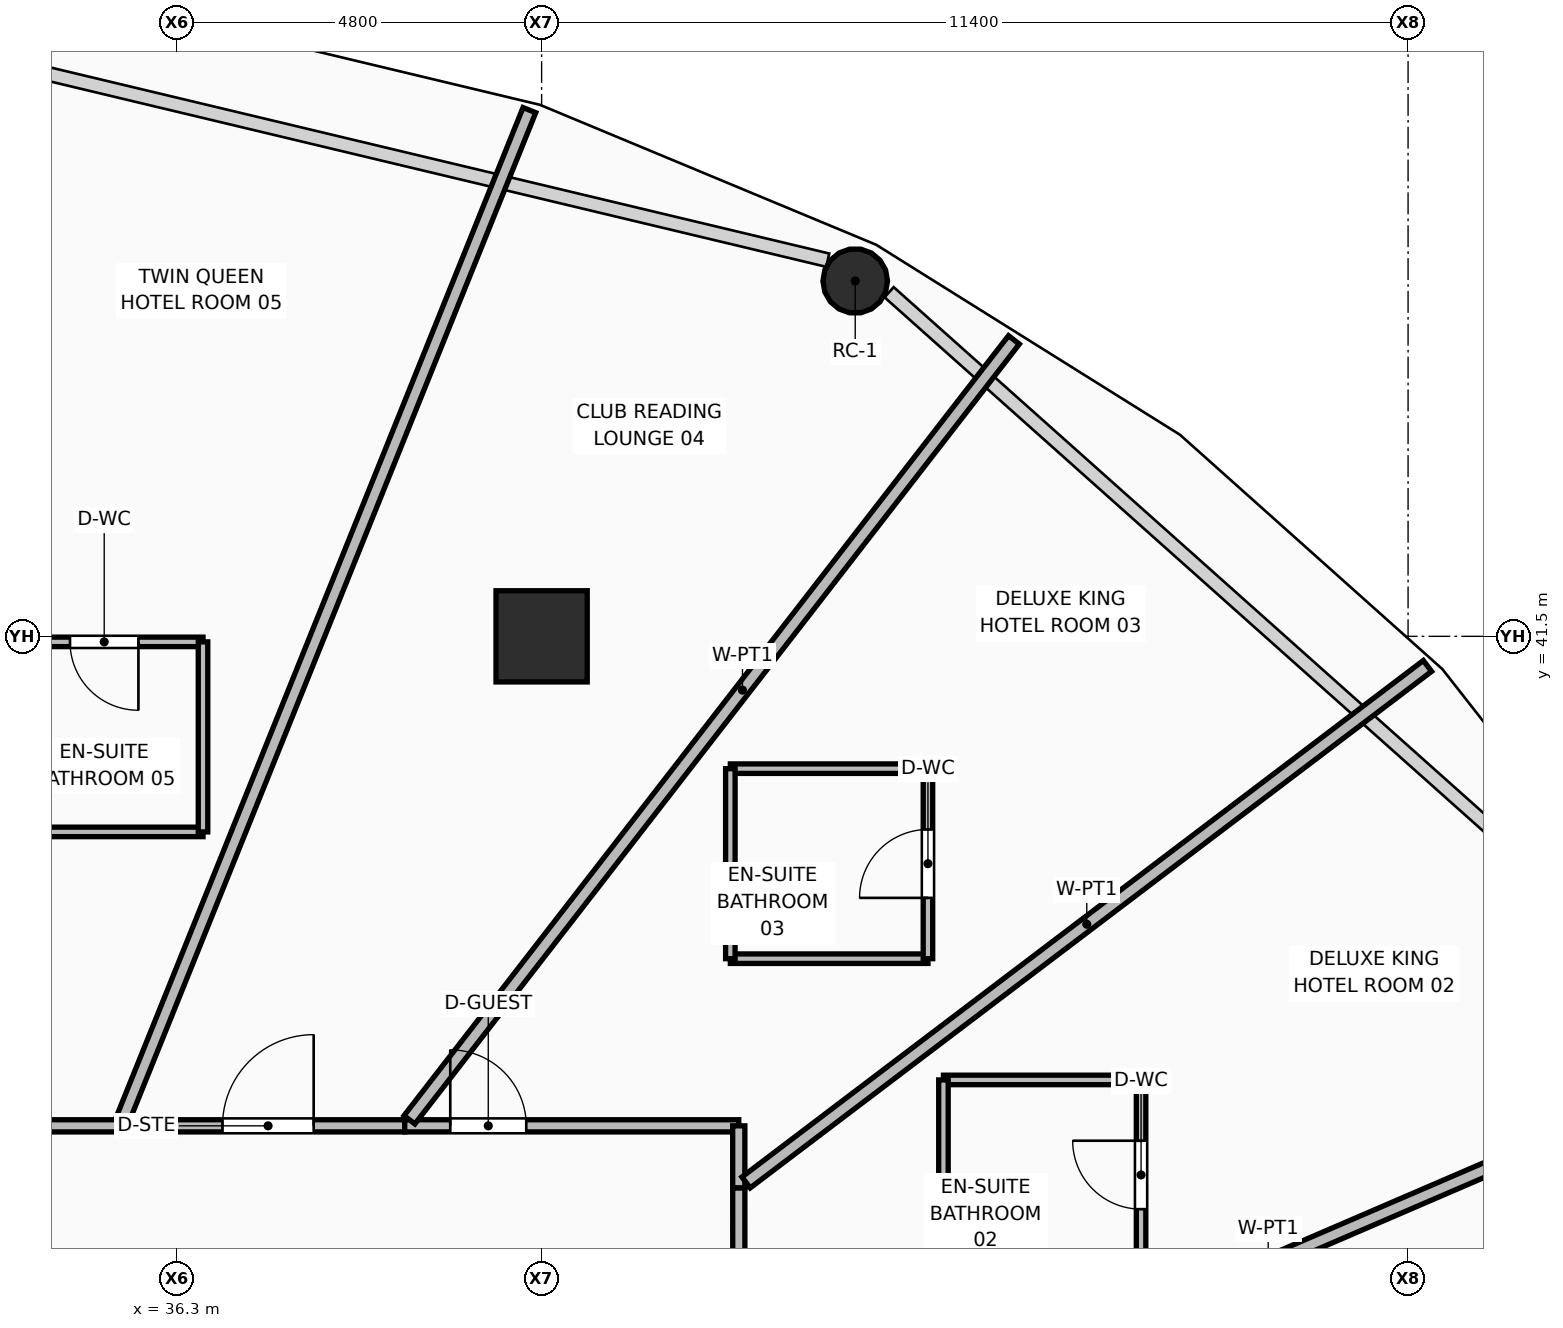
"""IFC4 building model, lengths in metres.
Left out: names, types, materials, properties, quantities, classifications, styles, units other than length and angle.
Written with IfcOpenShell. Run it as: python <this file> out.ifc"""

import sys

from ifc_helpers import new_model, si_unit, direction, frame, frame_2d, origin, origin_2d, place, context, subcontext, project, spatial, rectangle, hollow_rectangle, hollow_circle, extrude, element, fill, save


model = new_model("IFC4")
c1 = context("Model", 3, precision=1e-05, world=origin(), true_north=direction((0.0, 1.0)))
c2 = subcontext(c1, "Body", "Model", "MODEL_VIEW")
j1 = project(units=[si_unit("LENGTHUNIT", "METRE"), si_unit("PLANEANGLEUNIT", "RADIAN")], contexts=[c1])
p1 = place(None, origin())
s1 = spatial("IfcSite", under=j1, at=p1, CompositionType="ELEMENT")
p2 = place(p1, origin())
s2 = spatial("IfcBuilding", under=s1, at=p2, CompositionType="ELEMENT")
p3 = place(p2, frame((0.0, 0.0, 64.5)))
s3 = spatial("IfcBuildingStorey", under=s2, at=p3, CompositionType="ELEMENT", Elevation=64.5)
p4 = place(p3, frame((41.1, 41.5, 0.0), z_axis=(0.0, 0.0, 1.0), x_axis=(1.0, 0.0, 0.0)))
e1 = element("IfcColumn", 1, at=p4, inside=s3, PredefinedType="COLUMN", context=c2, shape_type="SweptSolid", body=[
    extrude(hollow_rectangle(XDim=1.2, YDim=1.2, WallThickness=0.045, at=origin_2d()), origin(), (0.0, 0.0, 1.0), 3.75),
])
p5 = place(p3, frame((45.226, 46.175, 0.0), z_axis=(0.026518396958, 0.041316317236, 0.998794141229), x_axis=(-0.841568257174, 0.540150783131, 0.0)))
e2 = element("IfcColumn", 2, at=p5, inside=s3, PredefinedType="COLUMN", context=c2, shape_type="SweptSolid", body=[
    extrude(hollow_circle(Radius=0.425, WallThickness=0.04, at=origin_2d()), origin(), (0.0, 0.0, 1.0), 3.729),
])
p6 = place(p3, frame((32.475, 35.06, 0.0), z_axis=(0.0, 0.0, 1.0), x_axis=(1.0, 0.0, 0.0)))
e3 = element("IfcWall", 3, at=p6, inside=s3, PredefinedType="PARTITIONING", context=c2, shape_type="SweptSolid", body=[
    extrude(rectangle(XDim=3.079, YDim=0.16, at=frame_2d((1.54, 0.0))), origin(), (0.0, 0.0, 1.0), 3.55),
])
p7 = place(p6, frame((1.04, 0.0, 0.0)))
e4 = element("IfcOpeningElement", 4, at=p7, cuts=e3, PredefinedType="OPENING", context=c2, shape_type="SweptSolid", body=[
    extrude(rectangle(XDim=1.0, YDim=2.1, at=frame_2d((0.5, 1.05))), frame((0.0, 0.09, 0.0), z_axis=(0.0, -1.0, 0.0), x_axis=(1.0, 0.0, 0.0)), (0.0, 0.0, 1.0), 0.18),
])
p8 = place(p3, frame((35.554, 35.06, 0.0), z_axis=(0.0, 0.0, 1.0), x_axis=(1.0, 0.0, 0.0)))
e5 = element("IfcWall", 5, at=p8, inside=s3, PredefinedType="PARTITIONING", context=c2, shape_type="SweptSolid", body=[
    extrude(rectangle(XDim=3.745, YDim=0.16, at=frame_2d((1.873, 0.0))), origin(), (0.0, 0.0, 1.0), 3.55),
])
p9 = place(p8, frame((1.347, 0.0, 0.0)))
e6 = element("IfcOpeningElement", 6, at=p9, cuts=e5, PredefinedType="OPENING", context=c2, shape_type="SweptSolid", body=[
    extrude(rectangle(XDim=1.2, YDim=2.1, at=frame_2d((0.6, 1.05))), frame((0.0, 0.09, 0.0), z_axis=(0.0, -1.0, 0.0), x_axis=(1.0, 0.0, 0.0)), (0.0, 0.0, 1.0), 0.18),
])
p10 = place(p3, frame((39.299, 35.06, 0.0), z_axis=(0.0, 0.0, 1.0), x_axis=(1.0, 0.0, 0.0)))
e7 = element("IfcWall", 7, at=p10, inside=s3, PredefinedType="PARTITIONING", context=c2, shape_type="SweptSolid", body=[
    extrude(rectangle(XDim=4.395, YDim=0.16, at=frame_2d((2.198, 0.0))), origin(), (0.0, 0.0, 1.0), 2.888),
])
p11 = place(p10, frame((0.599, 0.0, 0.0)))
e8 = element("IfcOpeningElement", 8, at=p11, cuts=e7, PredefinedType="OPENING", context=c2, shape_type="SweptSolid", body=[
    extrude(rectangle(XDim=1.0, YDim=2.1, at=frame_2d((0.5, 1.05))), frame((0.0, 0.09, 0.0), z_axis=(0.0, -1.0, 0.0), x_axis=(1.0, 0.0, 0.0)), (0.0, 0.0, 1.0), 0.18),
])
p12 = place(p3, frame((43.694, 35.06, 0.0), z_axis=(0.0, 0.0, 1.0), x_axis=(0.0, -1.0, 0.0)))
e9 = element("IfcWall", 9, at=p12, inside=s3, PredefinedType="PARTITIONING", context=c2, shape_type="SweptSolid", body=[
    extrude(rectangle(XDim=0.818, YDim=0.16, at=frame_2d((0.409, 0.0))), origin(), (0.0, 0.0, 1.0), 3.55),
])
p13 = place(p3, frame((43.694, 34.242, 0.0), z_axis=(0.0, 0.0, 1.0), x_axis=(0.00073479865, -0.999999730035, 0.0)))
e10 = element("IfcWall", 10, at=p13, inside=s3, PredefinedType="PARTITIONING", context=c2, shape_type="SweptSolid", body=[
    extrude(rectangle(XDim=3.987, YDim=0.16, at=frame_2d((1.994, 0.0))), origin(), (0.0, 0.0, 1.0), 2.888),
])
p14 = place(p13, frame((2.383, 0.0, 0.0)))
e11 = element("IfcOpeningElement", 11, at=p14, cuts=e10, PredefinedType="OPENING", context=c2, shape_type="SweptSolid", body=[
    extrude(rectangle(XDim=1.0, YDim=2.1, at=frame_2d((0.5, 1.05))), frame((0.0, 0.09, 0.0), z_axis=(0.0, -1.0, 0.0), x_axis=(1.0, 0.0, 0.0)), (0.0, 0.0, 1.0), 0.18),
])
p15 = place(p3, frame((43.79, 30.295, 0.0), z_axis=(0.0, 0.0, 1.0), x_axis=(0.918393435046, 0.395668419846, 0.0)))
e12 = element("IfcWall", 12, at=p15, inside=s3, PredefinedType="PARTITIONING", context=c2, shape_type="SweptSolid", body=[
    extrude(rectangle(XDim=13.875, YDim=0.18, at=frame_2d((6.938, 0.0))), origin(), (0.0, 0.0, 1.0), 2.735),
])
p16 = place(p3, frame((43.79, 34.315, 0.0), z_axis=(0.0, 0.0, 1.0), x_axis=(0.796937326032, 0.604061998786, 0.0)))
e13 = element("IfcWall", 13, at=p16, inside=s3, PredefinedType="PARTITIONING", context=c2, shape_type="SweptSolid", body=[
    extrude(rectangle(XDim=11.249, YDim=0.18, at=frame_2d((5.625, 0.0))), origin(), (0.0, 0.0, 1.0), 2.735),
])
p17 = place(p3, frame((39.361, 35.14, 0.0), z_axis=(0.0, 0.0, 1.0), x_axis=(0.612637755807, 0.790363827714, 0.0)))
e14 = element("IfcWall", 14, at=p17, inside=s3, PredefinedType="PARTITIONING", context=c2, shape_type="SweptSolid", body=[
    extrude(rectangle(XDim=12.981, YDim=0.18, at=frame_2d((6.491, 0.0))), origin(), (0.0, 0.0, 1.0), 2.735),
])
p18 = place(p3, frame((35.586, 35.14, 0.0), z_axis=(0.0, 0.0, 1.0), x_axis=(0.373781962033, 0.927516600853, 0.0)))
e15 = element("IfcWall", 15, at=p18, inside=s3, PredefinedType="PARTITIONING", context=c2, shape_type="SweptSolid", body=[
    extrude(rectangle(XDim=14.321, YDim=0.18, at=frame_2d((7.161, 0.0))), origin(), (0.0, 0.0, 1.0), 2.735),
])
p19 = place(p3, frame((46.387, 35.664, 0.0), z_axis=(0.0, 0.0, 1.0), x_axis=(1.0, 0.0, 0.0)))
e16 = element("IfcWall", 16, at=p19, inside=s3, PredefinedType="PARTITIONING", context=c2, shape_type="SweptSolid", body=[
    extrude(rectangle(XDim=2.6, YDim=0.125, at=frame_2d((1.3, 0.0))), origin(), (0.0, 0.0, 1.0), 3.55),
])
p20 = place(p3, frame((46.387, 33.164, 0.0), z_axis=(0.0, 0.0, 1.0), x_axis=(0.0, 1.0, 0.0)))
e17 = element("IfcWall", 17, at=p20, inside=s3, PredefinedType="PARTITIONING", context=c2, shape_type="SweptSolid", body=[
    extrude(rectangle(XDim=2.5, YDim=0.125, at=frame_2d((1.25, 0.0))), origin(), (0.0, 0.0, 1.0), 2.888),
])
p21 = place(p3, frame((48.987, 33.164, 0.0), z_axis=(0.0, 0.0, 1.0), x_axis=(0.0, 1.0, 0.0)))
e18 = element("IfcWall", 18, at=p21, inside=s3, PredefinedType="PARTITIONING", context=c2, shape_type="SweptSolid", body=[
    extrude(rectangle(XDim=2.5, YDim=0.125, at=frame_2d((1.25, 0.0))), origin(), (0.0, 0.0, 1.0), 2.888),
])
p22 = place(p21, frame((0.8, 0.0, 0.0)))
e19 = element("IfcOpeningElement", 19, at=p22, cuts=e18, PredefinedType="OPENING", context=c2, shape_type="SweptSolid", body=[
    extrude(rectangle(XDim=0.9, YDim=2.1, at=frame_2d((0.45, 1.05))), frame((0.0, 0.073, 0.0), z_axis=(0.0, -1.0, 0.0), x_axis=(1.0, 0.0, 0.0)), (0.0, 0.0, 1.0), 0.145),
])
p23 = place(p3, frame((43.583, 37.259, 0.0), z_axis=(0.0, 0.0, 1.0), x_axis=(1.0, 0.0, 0.0)))
e20 = element("IfcWall", 20, at=p23, inside=s3, PredefinedType="PARTITIONING", context=c2, shape_type="SweptSolid", body=[
    extrude(rectangle(XDim=2.6, YDim=0.125, at=frame_2d((1.3, 0.0))), origin(), (0.0, 0.0, 1.0), 3.178),
])
p24 = place(p3, frame((43.583, 39.759, 0.0), z_axis=(0.0, 0.0, 1.0), x_axis=(1.0, 0.0, 0.0)))
e21 = element("IfcWall", 21, at=p24, inside=s3, PredefinedType="PARTITIONING", context=c2, shape_type="SweptSolid", body=[
    extrude(rectangle(XDim=2.6, YDim=0.125, at=frame_2d((1.3, 0.0))), origin(), (0.0, 0.0, 1.0), 2.888),
])
p25 = place(p3, frame((43.583, 37.259, 0.0), z_axis=(0.0, 0.0, 1.0), x_axis=(0.0, 1.0, 0.0)))
e22 = element("IfcWall", 22, at=p25, inside=s3, PredefinedType="PARTITIONING", context=c2, shape_type="SweptSolid", body=[
    extrude(rectangle(XDim=2.5, YDim=0.125, at=frame_2d((1.25, 0.0))), origin(), (0.0, 0.0, 1.0), 2.888),
])
p26 = place(p3, frame((46.183, 37.259, 0.0), z_axis=(0.0, 0.0, 1.0), x_axis=(0.0, 1.0, 0.0)))
e23 = element("IfcWall", 23, at=p26, inside=s3, PredefinedType="PARTITIONING", context=c2, shape_type="SweptSolid", body=[
    extrude(rectangle(XDim=2.5, YDim=0.125, at=frame_2d((1.25, 0.0))), origin(), (0.0, 0.0, 1.0), 3.178),
])
p27 = place(p26, frame((0.8, 0.0, 0.0)))
e24 = element("IfcOpeningElement", 24, at=p27, cuts=e23, PredefinedType="OPENING", context=c2, shape_type="SweptSolid", body=[
    extrude(rectangle(XDim=0.9, YDim=2.1, at=frame_2d((0.45, 1.05))), frame((0.0, 0.073, 0.0), z_axis=(0.0, -1.0, 0.0), x_axis=(1.0, 0.0, 0.0)), (0.0, 0.0, 1.0), 0.145),
])
p28 = place(p3, frame((34.045, 38.927, 0.0), z_axis=(0.0, 0.0, 1.0), x_axis=(1.0, 0.0, 0.0)))
e25 = element("IfcWall", 25, at=p28, inside=s3, PredefinedType="PARTITIONING", context=c2, shape_type="SweptSolid", body=[
    extrude(rectangle(XDim=2.6, YDim=0.125, at=frame_2d((1.3, 0.0))), origin(), (0.0, 0.0, 1.0), 3.55),
])
p29 = place(p3, frame((34.045, 41.427, 0.0), z_axis=(0.0, 0.0, 1.0), x_axis=(1.0, 0.0, 0.0)))
e26 = element("IfcWall", 26, at=p29, inside=s3, PredefinedType="PARTITIONING", context=c2, shape_type="SweptSolid", body=[
    extrude(rectangle(XDim=2.6, YDim=0.125, at=frame_2d((1.3, 0.0))), origin(), (0.0, 0.0, 1.0), 3.55),
])
p30 = place(p29, frame((0.85, 0.0, 0.0)))
e27 = element("IfcOpeningElement", 27, at=p30, cuts=e26, PredefinedType="OPENING", context=c2, shape_type="SweptSolid", body=[
    extrude(rectangle(XDim=0.9, YDim=2.1, at=frame_2d((0.45, 1.05))), frame((0.0, 0.073, 0.0), z_axis=(0.0, -1.0, 0.0), x_axis=(1.0, 0.0, 0.0)), (0.0, 0.0, 1.0), 0.145),
])
p31 = place(p3, frame((36.645, 38.927, 0.0), z_axis=(0.0, 0.0, 1.0), x_axis=(0.0, 1.0, 0.0)))
e28 = element("IfcWall", 28, at=p31, inside=s3, PredefinedType="PARTITIONING", context=c2, shape_type="SweptSolid", body=[
    extrude(rectangle(XDim=2.5, YDim=0.125, at=frame_2d((1.25, 0.0))), origin(), (0.0, 0.0, 1.0), 3.55),
])
p32 = place(p22, origin())
e29 = element("IfcDoor", 29, at=p32, inside=s3, OperationType="SINGLE_SWING_RIGHT", PredefinedType="DOOR", context=c2, shape_type="SweptSolid", body=[
    extrude(rectangle(XDim=0.9, YDim=2.1, at=frame_2d((0.45, 1.05))), frame((0.0, 0.025, 0.0), z_axis=(0.0, -1.0, 0.0), x_axis=(1.0, 0.0, 0.0)), (0.0, 0.0, 1.0), 0.05),
])
fill(e19, e29)
p33 = place(p27, origin())
e30 = element("IfcDoor", 30, at=p33, inside=s3, OperationType="SINGLE_SWING_LEFT", PredefinedType="DOOR", context=c2, shape_type="SweptSolid", body=[
    extrude(rectangle(XDim=0.9, YDim=2.1, at=frame_2d((0.45, 1.05))), frame((0.0, 0.025, 0.0), z_axis=(0.0, -1.0, 0.0), x_axis=(1.0, 0.0, 0.0)), (0.0, 0.0, 1.0), 0.05),
])
fill(e24, e30)
p34 = place(p11, origin())
e31 = element("IfcDoor", 31, at=p34, inside=s3, OperationType="SINGLE_SWING_LEFT", PredefinedType="DOOR", context=c2, shape_type="SweptSolid", body=[
    extrude(rectangle(XDim=1.0, YDim=2.1, at=frame_2d((0.5, 1.05))), frame((0.0, 0.025, 0.0), z_axis=(0.0, -1.0, 0.0), x_axis=(1.0, 0.0, 0.0)), (0.0, 0.0, 1.0), 0.05),
])
fill(e8, e31)
p35 = place(p9, origin())
e32 = element("IfcDoor", 32, at=p35, inside=s3, OperationType="SINGLE_SWING_RIGHT", PredefinedType="DOOR", context=c2, shape_type="SweptSolid", body=[
    extrude(rectangle(XDim=1.2, YDim=2.1, at=frame_2d((0.6, 1.05))), frame((0.0, 0.025, 0.0), z_axis=(0.0, -1.0, 0.0), x_axis=(1.0, 0.0, 0.0)), (0.0, 0.0, 1.0), 0.05),
])
fill(e6, e32)
p36 = place(p30, frame((0.9, 0.0, 0.0), z_axis=(0.0, 0.0, 1.0), x_axis=(-1.0, 0.0, 0.0)))
e33 = element("IfcDoor", 33, at=p36, inside=s3, OperationType="SINGLE_SWING_LEFT", PredefinedType="DOOR", context=c2, shape_type="SweptSolid", body=[
    extrude(rectangle(XDim=0.9, YDim=2.1, at=frame_2d((0.45, 1.05))), frame((0.0, 0.025, 0.0), z_axis=(0.0, -1.0, 0.0), x_axis=(1.0, 0.0, 0.0)), (0.0, 0.0, 1.0), 0.05),
])
fill(e27, e33)
save(model, sys.argv[1])
